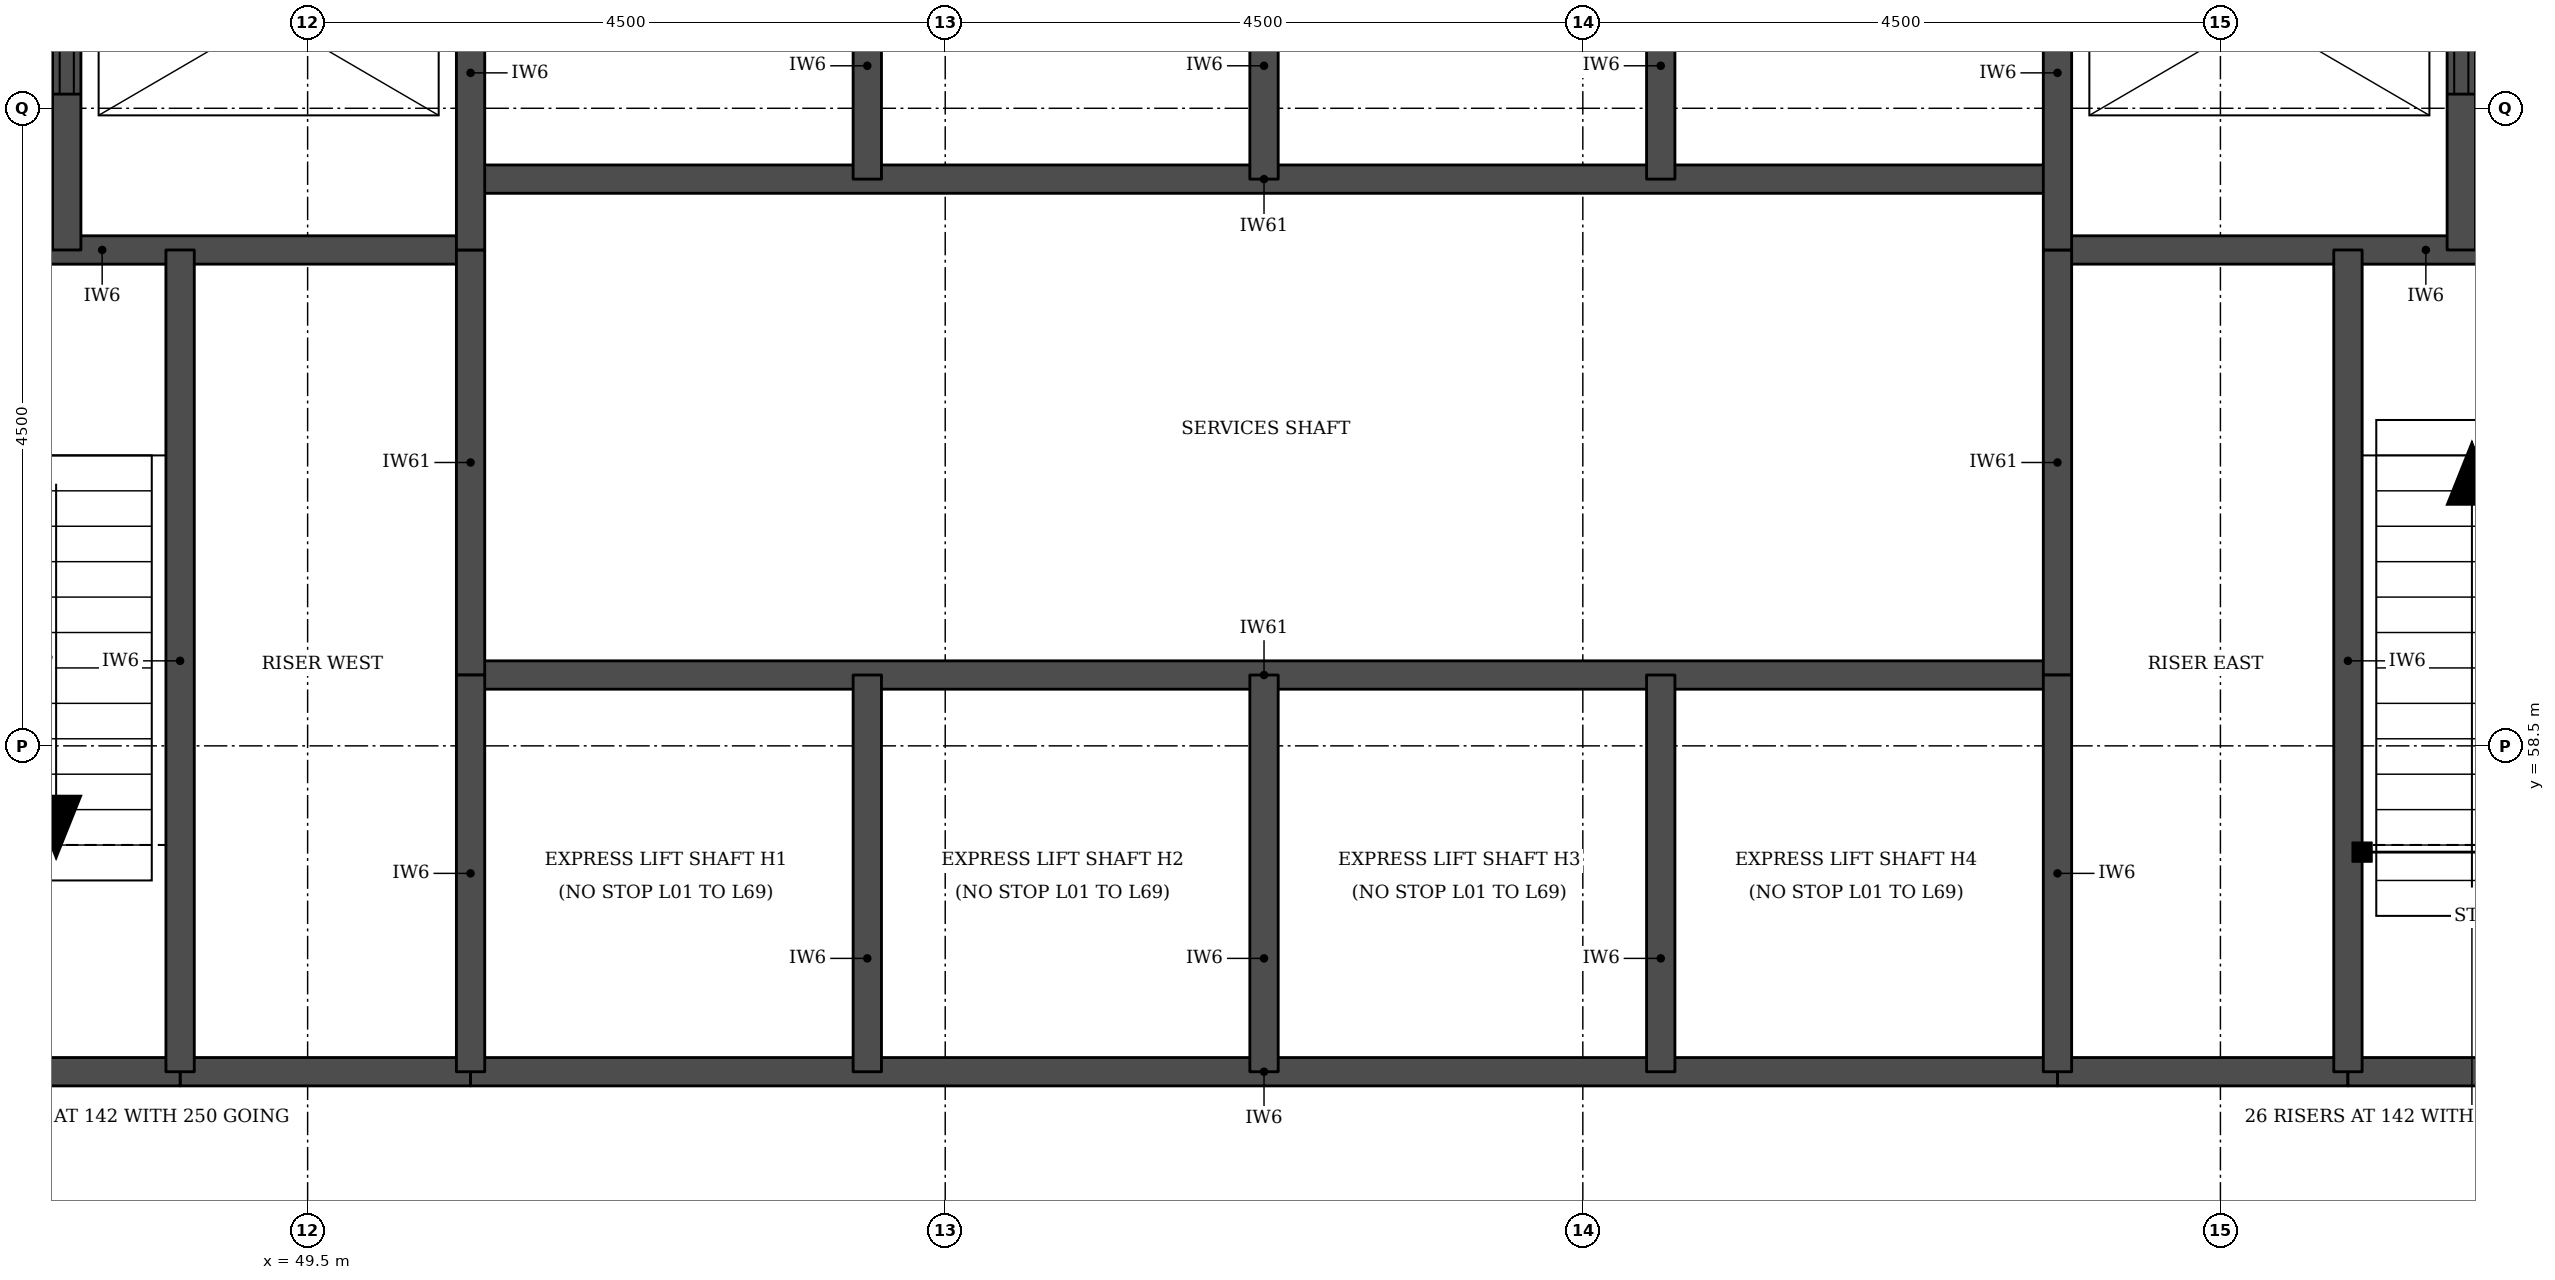
"""IFC4 building model, lengths in metres.
Left out: names, types, materials, properties, quantities, classifications, styles, units other than length and angle.
Written with IfcOpenShell. Run it as: python <this file> out.ifc"""

import sys

from ifc_helpers import new_model, si_unit, direction, frame, frame_2d, origin, place, context, subcontext, project, spatial, rectangle, extrude, element, fill, save


model = new_model("IFC4")
c1 = context("Model", 3, precision=1e-05, world=origin(), true_north=direction((0.0, 1.0)))
c2 = subcontext(c1, "Body", "Model", "MODEL_VIEW")
j1 = project(units=[si_unit("LENGTHUNIT", "METRE"), si_unit("PLANEANGLEUNIT", "RADIAN")], contexts=[c1])
p1 = place(None, origin())
s1 = spatial("IfcSite", under=j1, at=p1, CompositionType="ELEMENT")
p2 = place(p1, origin())
s2 = spatial("IfcBuilding", under=s1, at=p2, CompositionType="ELEMENT")
p3 = place(p2, frame((0.0, 0.0, 127.0)))
s3 = spatial("IfcBuildingStorey", under=s2, at=p3, CompositionType="ELEMENT", Elevation=127.0)
for number, where, z_axis, x_axis in (
    (1, (48.6, 56.2, 0.0), (0.0, 0.0, 1.0), (1.0, 0.0, 0.0)),
    (2, (61.85, 56.2, 0.0), (0.0, 0.0, 1.0), (1.0, 0.0, 0.0)),
):
    element("IfcWall", number, at=place(p3, frame(where, z_axis=z_axis, x_axis=x_axis)), inside=s3, PredefinedType="SOLIDWALL", context=c2, shape_type="SweptSolid", body=[
        extrude(rectangle(XDim=2.05, YDim=0.2, at=frame_2d((1.025, 0.0))), origin(), (0.0, 0.0, 1.0), 3.55),
    ])
p4 = place(p3, frame((45.45, 56.2, 0.0), z_axis=(0.0, 0.0, 1.0), x_axis=(1.0, 0.0, 0.0)))
e3 = element("IfcWall", 3, at=p4, inside=s3, PredefinedType="SOLIDWALL", context=c2, shape_type="SweptSolid", body=[
    extrude(rectangle(XDim=3.15, YDim=0.2, at=frame_2d((1.575, 0.0))), origin(), (0.0, 0.0, 1.0), 3.55),
])
p5 = place(p3, frame((50.65, 56.2, 0.0), z_axis=(0.0, 0.0, 1.0), x_axis=(1.0, 0.0, 0.0)))
e4 = element("IfcWall", 4, at=p5, inside=s3, PredefinedType="SOLIDWALL", context=c2, shape_type="SweptSolid", body=[
    extrude(rectangle(XDim=11.2, YDim=0.2, at=frame_2d((5.6, 0.0))), origin(), (0.0, 0.0, 1.0), 3.55),
])
p6 = place(p3, frame((63.9, 56.2, 0.0), z_axis=(0.0, 0.0, 1.0), x_axis=(1.0, 0.0, 0.0)))
e5 = element("IfcWall", 5, at=p6, inside=s3, PredefinedType="SOLIDWALL", context=c2, shape_type="SweptSolid", body=[
    extrude(rectangle(XDim=3.15, YDim=0.2, at=frame_2d((1.575, 0.0))), origin(), (0.0, 0.0, 1.0), 3.55),
])
p7 = place(p3, frame((50.65, 59.0, 0.0), z_axis=(0.0, 0.0, 1.0), x_axis=(1.0, 0.0, 0.0)))
e6 = element("IfcWall", 6, at=p7, inside=s3, PredefinedType="SOLIDWALL", context=c2, shape_type="SweptSolid", body=[
    extrude(rectangle(XDim=11.2, YDim=0.2, at=frame_2d((5.6, 0.0))), origin(), (0.0, 0.0, 1.0), 3.7),
])
for number, where, z_axis, x_axis in (
    (7, (45.45, 62.0, 0.0), (0.0, 0.0, 1.0), (1.0, 0.0, 0.0)),
    (8, (61.85, 62.0, 0.0), (0.0, 0.0, 1.0), (1.0, 0.0, 0.0)),
):
    element("IfcWall", number, at=place(p3, frame(where, z_axis=z_axis, x_axis=x_axis)), inside=s3, PredefinedType="SOLIDWALL", context=c2, shape_type="SweptSolid", body=[
        extrude(rectangle(XDim=5.2, YDim=0.2, at=frame_2d((2.6, 0.0))), origin(), (0.0, 0.0, 1.0), 3.55),
    ])
p8 = place(p3, frame((50.65, 62.5, 0.0), z_axis=(0.0, 0.0, 1.0), x_axis=(1.0, 0.0, 0.0)))
e9 = element("IfcWall", 9, at=p8, inside=s3, PredefinedType="SOLIDWALL", context=c2, shape_type="SweptSolid", body=[
    extrude(rectangle(XDim=11.2, YDim=0.2, at=frame_2d((5.6, 0.0))), origin(), (0.0, 0.0, 1.0), 3.7),
])
p9 = place(p3, frame((47.8, 62.0, 0.0), z_axis=(0.0, 0.0, 1.0), x_axis=(0.0, 1.0, 0.0)))
e10 = element("IfcWall", 10, at=p9, inside=s3, PredefinedType="SOLIDWALL", context=c2, shape_type="SweptSolid", body=[
    extrude(rectangle(XDim=3.3, YDim=0.2, at=frame_2d((1.65, 0.0))), origin(), (0.0, 0.0, 1.0), 3.55),
])
p10 = place(p9, frame((1.1, 0.0, 0.0)))
e11 = element("IfcOpeningElement", 11, at=p10, cuts=e10, PredefinedType="OPENING", context=c2, shape_type="SweptSolid", body=[
    extrude(rectangle(XDim=1.1, YDim=2.1, at=frame_2d((0.55, 1.05))), frame((0.0, 0.11, 0.0), z_axis=(0.0, -1.0, 0.0), x_axis=(1.0, 0.0, 0.0)), (0.0, 0.0, 1.0), 0.22),
])
p11 = place(p3, frame((48.6, 56.2, 0.0), z_axis=(0.0, 0.0, 1.0), x_axis=(0.0, 1.0, 0.0)))
e12 = element("IfcWall", 12, at=p11, inside=s3, PredefinedType="SOLIDWALL", context=c2, shape_type="SweptSolid", body=[
    extrude(rectangle(XDim=5.8, YDim=0.2, at=frame_2d((2.9, 0.0))), origin(), (0.0, 0.0, 1.0), 3.55),
])
p12 = place(p3, frame((50.65, 59.0, 0.0), z_axis=(0.0, 0.0, 1.0), x_axis=(0.0, 1.0, 0.0)))
e13 = element("IfcWall", 13, at=p12, inside=s3, PredefinedType="SOLIDWALL", context=c2, shape_type="SweptSolid", body=[
    extrude(rectangle(XDim=3.0, YDim=0.2, at=frame_2d((1.5, 0.0))), origin(), (0.0, 0.0, 1.0), 3.7),
])
p13 = place(p3, frame((50.65, 56.2, 0.0), z_axis=(0.0, 0.0, 1.0), x_axis=(0.0, 1.0, 0.0)))
e14 = element("IfcWall", 14, at=p13, inside=s3, PredefinedType="SOLIDWALL", context=c2, shape_type="SweptSolid", body=[
    extrude(rectangle(XDim=2.8, YDim=0.2, at=frame_2d((1.4, 0.0))), origin(), (0.0, 0.0, 1.0), 3.55),
])
p14 = place(p3, frame((50.65, 62.0, 0.0), z_axis=(0.0, 0.0, 1.0), x_axis=(0.0, 1.0, 0.0)))
e15 = element("IfcWall", 15, at=p14, inside=s3, PredefinedType="SOLIDWALL", context=c2, shape_type="SweptSolid", body=[
    extrude(rectangle(XDim=3.3, YDim=0.2, at=frame_2d((1.65, 0.0))), origin(), (0.0, 0.0, 1.0), 3.55),
])
for number, where, z_axis, x_axis in (
    (16, (53.45, 56.2, 0.0), (0.0, 0.0, 1.0), (0.0, 1.0, 0.0)),
    (17, (53.45, 62.5, 0.0), (0.0, 0.0, 1.0), (0.0, 1.0, 0.0)),
    (18, (56.25, 56.2, 0.0), (0.0, 0.0, 1.0), (0.0, 1.0, 0.0)),
    (19, (56.25, 62.5, 0.0), (0.0, 0.0, 1.0), (0.0, 1.0, 0.0)),
    (20, (59.05, 56.2, 0.0), (0.0, 0.0, 1.0), (0.0, 1.0, 0.0)),
    (21, (59.05, 62.5, 0.0), (0.0, 0.0, 1.0), (0.0, 1.0, 0.0)),
):
    element("IfcWall", number, at=place(p3, frame(where, z_axis=z_axis, x_axis=x_axis)), inside=s3, PredefinedType="SOLIDWALL", context=c2, shape_type="SweptSolid", body=[
        extrude(rectangle(XDim=2.8, YDim=0.2, at=frame_2d((1.4, 0.0))), origin(), (0.0, 0.0, 1.0), 3.55),
    ])
p15 = place(p3, frame((61.85, 59.0, 0.0), z_axis=(0.0, 0.0, 1.0), x_axis=(0.0, 1.0, 0.0)))
e22 = element("IfcWall", 22, at=p15, inside=s3, PredefinedType="SOLIDWALL", context=c2, shape_type="SweptSolid", body=[
    extrude(rectangle(XDim=3.0, YDim=0.2, at=frame_2d((1.5, 0.0))), origin(), (0.0, 0.0, 1.0), 3.7),
])
p16 = place(p3, frame((61.85, 56.2, 0.0), z_axis=(0.0, 0.0, 1.0), x_axis=(0.0, 1.0, 0.0)))
e23 = element("IfcWall", 23, at=p16, inside=s3, PredefinedType="SOLIDWALL", context=c2, shape_type="SweptSolid", body=[
    extrude(rectangle(XDim=2.8, YDim=0.2, at=frame_2d((1.4, 0.0))), origin(), (0.0, 0.0, 1.0), 3.55),
])
p17 = place(p3, frame((61.85, 62.0, 0.0), z_axis=(0.0, 0.0, 1.0), x_axis=(0.0, 1.0, 0.0)))
e24 = element("IfcWall", 24, at=p17, inside=s3, PredefinedType="SOLIDWALL", context=c2, shape_type="SweptSolid", body=[
    extrude(rectangle(XDim=3.3, YDim=0.2, at=frame_2d((1.65, 0.0))), origin(), (0.0, 0.0, 1.0), 3.55),
])
p18 = place(p3, frame((63.9, 56.2, 0.0), z_axis=(0.0, 0.0, 1.0), x_axis=(0.0, 1.0, 0.0)))
e25 = element("IfcWall", 25, at=p18, inside=s3, PredefinedType="SOLIDWALL", context=c2, shape_type="SweptSolid", body=[
    extrude(rectangle(XDim=5.8, YDim=0.2, at=frame_2d((2.9, 0.0))), origin(), (0.0, 0.0, 1.0), 3.55),
])
p19 = place(p3, frame((64.7, 62.0, 0.0), z_axis=(0.0, 0.0, 1.0), x_axis=(0.0, 1.0, 0.0)))
e26 = element("IfcWall", 26, at=p19, inside=s3, PredefinedType="SOLIDWALL", context=c2, shape_type="SweptSolid", body=[
    extrude(rectangle(XDim=3.3, YDim=0.2, at=frame_2d((1.65, 0.0))), origin(), (0.0, 0.0, 1.0), 3.55),
])
p20 = place(p19, frame((1.1, 0.0, 0.0)))
e27 = element("IfcOpeningElement", 27, at=p20, cuts=e26, PredefinedType="OPENING", context=c2, shape_type="SweptSolid", body=[
    extrude(rectangle(XDim=1.1, YDim=2.1, at=frame_2d((0.55, 1.05))), frame((0.0, 0.11, 0.0), z_axis=(0.0, -1.0, 0.0), x_axis=(1.0, 0.0, 0.0)), (0.0, 0.0, 1.0), 0.22),
])
p21 = place(p10, origin())
e28 = element("IfcDoor", 28, at=p21, inside=s3, OperationType="DOUBLE_DOOR_SLIDING", PredefinedType="DOOR", context=c2, shape_type="SweptSolid", body=[
    extrude(rectangle(XDim=1.1, YDim=2.1, at=frame_2d((0.55, 1.05))), frame((0.0, 0.025, 0.0), z_axis=(0.0, -1.0, 0.0), x_axis=(1.0, 0.0, 0.0)), (0.0, 0.0, 1.0), 0.05),
])
fill(e11, e28)
p22 = place(p20, origin())
e29 = element("IfcDoor", 29, at=p22, inside=s3, OperationType="DOUBLE_DOOR_SLIDING", PredefinedType="DOOR", context=c2, shape_type="SweptSolid", body=[
    extrude(rectangle(XDim=1.1, YDim=2.1, at=frame_2d((0.55, 1.05))), frame((0.0, 0.025, 0.0), z_axis=(0.0, -1.0, 0.0), x_axis=(1.0, 0.0, 0.0)), (0.0, 0.0, 1.0), 0.05),
])
fill(e27, e29)
save(model, sys.argv[1])
